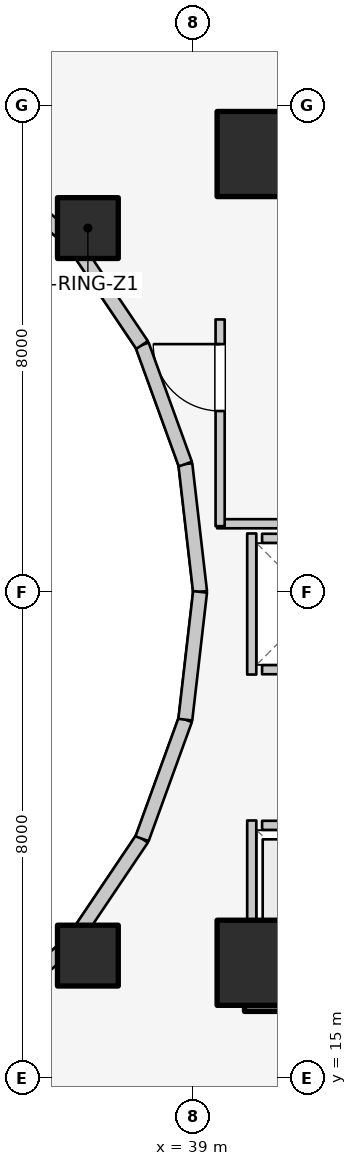
"""IFC4 building model, lengths in metres.
Left out: names, types, materials, properties, quantities, classifications, styles, units other than length and angle.
Written with IfcOpenShell. Run it as: python <this file> out.ifc"""

import sys

from ifc_helpers import new_model, si_unit, direction, frame, frame_2d, origin, origin_2d, place, context, subcontext, project, spatial, rectangle, extrude, element, fill, save


model = new_model("IFC4")
c1 = context("Model", 3, precision=1e-05, world=origin(), true_north=direction((0.0, 1.0)))
c2 = subcontext(c1, "Body", "Model", "MODEL_VIEW")
j1 = project(units=[si_unit("LENGTHUNIT", "METRE"), si_unit("PLANEANGLEUNIT", "RADIAN")], contexts=[c1])
p1 = place(None, origin())
s1 = spatial("IfcSite", under=j1, at=p1, CompositionType="ELEMENT")
p2 = place(p1, origin())
s2 = spatial("IfcBuilding", under=s1, at=p2, CompositionType="ELEMENT")
p3 = place(p2, frame((0.0, 0.0, 61.7)))
s3 = spatial("IfcBuildingStorey", under=s2, at=p3, CompositionType="ELEMENT", Elevation=61.7)
for number, where, z_axis, x_axis in (
    (1, (39.85, 16.55, 0.0), (0.0, 0.0, 1.0), (1.0, 0.0, 0.0)),
    (2, (39.85, 30.35, 0.0), (0.0, 0.0, 1.0), (1.0, 0.0, 0.0)),
):
    element("IfcWall", number, at=place(p3, frame(where, z_axis=z_axis, x_axis=x_axis)), inside=s3, PredefinedType="SHEAR", context=c2, shape_type="SweptSolid", body=[
        extrude(rectangle(XDim=4.5, YDim=0.9, at=frame_2d((2.25, 0.0))), origin(), (0.0, 0.0, 1.0), 3.1),
    ])
for number, where, z_axis, x_axis in (
    (3, (40.1, 16.9, 0.0), (0.0, 0.0, 1.0), (1.0, 0.0, 0.0)),
    (4, (40.1, 30.2, 0.0), (0.0, 0.0, 1.0), (1.0, 0.0, 0.0)),
):
    element("IfcColumn", number, at=place(p3, frame(where, z_axis=z_axis, x_axis=x_axis)), inside=s3, PredefinedType="COLUMN", context=c2, shape_type="SweptSolid", body=[
        extrude(rectangle(XDim=1.4, YDim=1.4, at=origin_2d()), origin(), (0.0, 0.0, 1.0), 3.1),
    ])
for number, where, z_axis, x_axis in (
    (5, (37.275, 28.982, 0.0), (0.0, 0.0, 1.0), (1.0, 0.0, 0.0)),
    (6, (37.275, 17.018, 0.0), (0.0, 0.0, 1.0), (1.0, 0.0, 0.0)),
):
    element("IfcColumn", number, at=place(p3, frame(where, z_axis=z_axis, x_axis=x_axis)), inside=s3, PredefinedType="COLUMN", context=c2, shape_type="SweptSolid", body=[
        extrude(rectangle(XDim=1.0, YDim=1.0, at=origin_2d()), origin(), (0.0, 0.0, 1.0), 3.1),
    ])
p4 = place(p3, frame((39.12, 23.0, 0.0), z_axis=(0.0, 0.0, 1.0), x_axis=(-0.114711713601, 0.993398823617, 0.0)))
e7 = element("IfcWall", 7, at=p4, inside=s3, PredefinedType="STANDARD", context=c2, shape_type="SweptSolid", body=[
    extrude(rectangle(XDim=2.115, YDim=0.23, at=frame_2d((1.058, 0.0))), origin(), (0.0, 0.0, 1.0), 2.56),
])
p5 = place(p3, frame((38.877, 25.102, 0.0), z_axis=(0.0, 0.0, 1.0), x_axis=(-0.341423187295, 0.93990968033, 0.0)))
e8 = element("IfcWall", 8, at=p5, inside=s3, PredefinedType="STANDARD", context=c2, shape_type="SweptSolid", body=[
    extrude(rectangle(XDim=2.084, YDim=0.23, at=frame_2d((1.042, 0.0))), origin(), (0.0, 0.0, 1.0), 2.56),
])
p6 = place(p3, frame((38.166, 27.06, 0.0), z_axis=(0.0, 0.0, 1.0), x_axis=(-0.558197800898, 0.829707909492, 0.0)))
e9 = element("IfcWall", 9, at=p6, inside=s3, PredefinedType="STANDARD", context=c2, shape_type="SweptSolid", body=[
    extrude(rectangle(XDim=2.027, YDim=0.23, at=frame_2d((1.013, 0.0))), origin(), (0.0, 0.0, 1.0), 1.22),
])
for number, where, z_axis, x_axis in (
    (10, (37.035, 28.742, 0.0), (0.0, 0.0, 1.0), (-0.753, 0.659, 0.0)),
    (11, (35.56, 15.968, 0.0), (0.0, 0.0, 1.0), (0.753, 0.659, 0.0)),
):
    element("IfcWall", number, at=place(p3, frame(where, z_axis=z_axis, x_axis=x_axis)), inside=s3, PredefinedType="STANDARD", context=c2, shape_type="SweptSolid", body=[
        extrude(rectangle(XDim=1.959, YDim=0.23, at=frame_2d((0.98, 0.0))), origin(), (0.0, 0.0, 1.0), 1.22),
    ])
p7 = place(p3, frame((37.035, 17.258, 0.0), z_axis=(0.0, 0.0, 1.0), x_axis=(0.558197800898, 0.829707909492, 0.0)))
e12 = element("IfcWall", 12, at=p7, inside=s3, PredefinedType="STANDARD", context=c2, shape_type="SweptSolid", body=[
    extrude(rectangle(XDim=2.027, YDim=0.23, at=frame_2d((1.013, 0.0))), origin(), (0.0, 0.0, 1.0), 1.22),
])
p8 = place(p3, frame((38.166, 18.94, 0.0), z_axis=(0.0, 0.0, 1.0), x_axis=(0.341423187295, 0.93990968033, 0.0)))
e13 = element("IfcWall", 13, at=p8, inside=s3, PredefinedType="STANDARD", context=c2, shape_type="SweptSolid", body=[
    extrude(rectangle(XDim=2.084, YDim=0.23, at=frame_2d((1.042, 0.0))), origin(), (0.0, 0.0, 1.0), 2.56),
])
p9 = place(p3, frame((38.877, 20.898, 0.0), z_axis=(0.0, 0.0, 1.0), x_axis=(0.114711713601, 0.993398823617, 0.0)))
e14 = element("IfcWall", 14, at=p9, inside=s3, PredefinedType="STANDARD", context=c2, shape_type="SweptSolid", body=[
    extrude(rectangle(XDim=2.115, YDim=0.23, at=frame_2d((1.058, 0.0))), origin(), (0.0, 0.0, 1.0), 2.56),
])
p10 = place(p3, frame((40.14, 19.16, 0.0), z_axis=(0.0, 0.0, 1.0), x_axis=(1.0, 0.0, 0.0)))
e15 = element("IfcWall", 15, at=p10, inside=s3, PredefinedType="SOLIDWALL", context=c2, shape_type="SweptSolid", body=[
    extrude(rectangle(XDim=1.82, YDim=0.15, at=frame_2d((0.91, 0.0))), origin(), (0.0, 0.0, 1.0), 2.12),
])
p11 = place(p10, frame((0.36, 0.0, 0.0)))
e16 = element("IfcOpeningElement", 16, at=p11, cuts=e15, PredefinedType="OPENING", context=c2, shape_type="SweptSolid", body=[
    extrude(rectangle(XDim=1.1, YDim=2.1, at=frame_2d((0.55, 1.05))), frame((0.0, 0.085, 0.0), z_axis=(0.0, -1.0, 0.0), x_axis=(1.0, 0.0, 0.0)), (0.0, 0.0, 1.0), 0.17),
])
p12 = place(p3, frame((40.14, 17.1, 0.0), z_axis=(0.0, 0.0, 1.0), x_axis=(1.0, 0.0, 0.0)))
e17 = element("IfcWall", 17, at=p12, inside=s3, PredefinedType="SOLIDWALL", context=c2, shape_type="SweptSolid", body=[
    extrude(rectangle(XDim=1.82, YDim=0.15, at=frame_2d((0.91, 0.0))), origin(), (0.0, 0.0, 1.0), 2.12),
])
p13 = place(p3, frame((39.97, 17.02, 0.0), z_axis=(0.0, 0.0, 1.0), x_axis=(0.0, 1.0, 0.0)))
e18 = element("IfcWall", 18, at=p13, inside=s3, PredefinedType="SOLIDWALL", context=c2, shape_type="SweptSolid", body=[
    extrude(rectangle(XDim=2.22, YDim=0.15, at=frame_2d((1.11, 0.0))), origin(), (0.0, 0.0, 1.0), 1.873),
])
for number, where, z_axis, x_axis in (
    (19, (40.14, 21.72, 0.0), (0.0, 0.0, 1.0), (1.0, 0.0, 0.0)),
    (20, (40.14, 23.88, 0.0), (0.0, 0.0, 1.0), (1.0, 0.0, 0.0)),
):
    element("IfcWall", number, at=place(p3, frame(where, z_axis=z_axis, x_axis=x_axis)), inside=s3, PredefinedType="SOLIDWALL", context=c2, shape_type="SweptSolid", body=[
        extrude(rectangle(XDim=1.82, YDim=0.15, at=frame_2d((0.91, 0.0))), origin(), (0.0, 0.0, 1.0), 2.12),
    ])
p14 = place(p3, frame((39.97, 21.64, 0.0), z_axis=(0.0, 0.0, 1.0), x_axis=(0.0, 1.0, 0.0)))
e21 = element("IfcWall", 21, at=p14, inside=s3, PredefinedType="SOLIDWALL", context=c2, shape_type="SweptSolid", body=[
    extrude(rectangle(XDim=2.32, YDim=0.15, at=frame_2d((1.16, 0.0))), origin(), (0.0, 0.0, 1.0), 2.12),
])
p15 = place(p3, frame((39.4, 24.12, 0.0), z_axis=(0.0, 0.0, 1.0), x_axis=(1.0, 0.0, 0.0)))
e22 = element("IfcWall", 22, at=p15, inside=s3, PredefinedType="PARTITIONING", context=c2, shape_type="SweptSolid", body=[
    extrude(rectangle(XDim=5.08, YDim=0.15, at=frame_2d((2.54, 0.0))), origin(), (0.0, 0.0, 1.0), 2.12),
])
p16 = place(p3, frame((39.45, 24.08, 0.0), z_axis=(0.0, 0.0, 1.0), x_axis=(0.0, 1.0, 0.0)))
e23 = element("IfcWall", 23, at=p16, inside=s3, PredefinedType="PARTITIONING", context=c2, shape_type="SweptSolid", body=[
    extrude(rectangle(XDim=3.4, YDim=0.15, at=frame_2d((1.7, 0.0))), origin(), (0.0, 0.0, 1.0), 2.575),
])
p17 = place(p16, frame((1.894, 0.0, 0.0)))
e24 = element("IfcOpeningElement", 24, at=p17, cuts=e23, PredefinedType="OPENING", context=c2, shape_type="SweptSolid", body=[
    extrude(rectangle(XDim=1.1, YDim=2.1, at=frame_2d((0.55, 1.05))), frame((0.0, 0.085, 0.0), z_axis=(0.0, -1.0, 0.0), x_axis=(1.0, 0.0, 0.0)), (0.0, 0.0, 1.0), 0.17),
])
p18 = place(p17, origin())
e25 = element("IfcDoor", 25, at=p18, inside=s3, OperationType="SINGLE_SWING_RIGHT", PredefinedType="DOOR", context=c2, shape_type="SweptSolid", body=[
    extrude(rectangle(XDim=1.1, YDim=2.1, at=frame_2d((0.55, 1.05))), frame((0.0, 0.025, 0.0), z_axis=(0.0, -1.0, 0.0), x_axis=(1.0, 0.0, 0.0)), (0.0, 0.0, 1.0), 0.05),
])
fill(e24, e25)
save(model, sys.argv[1])
